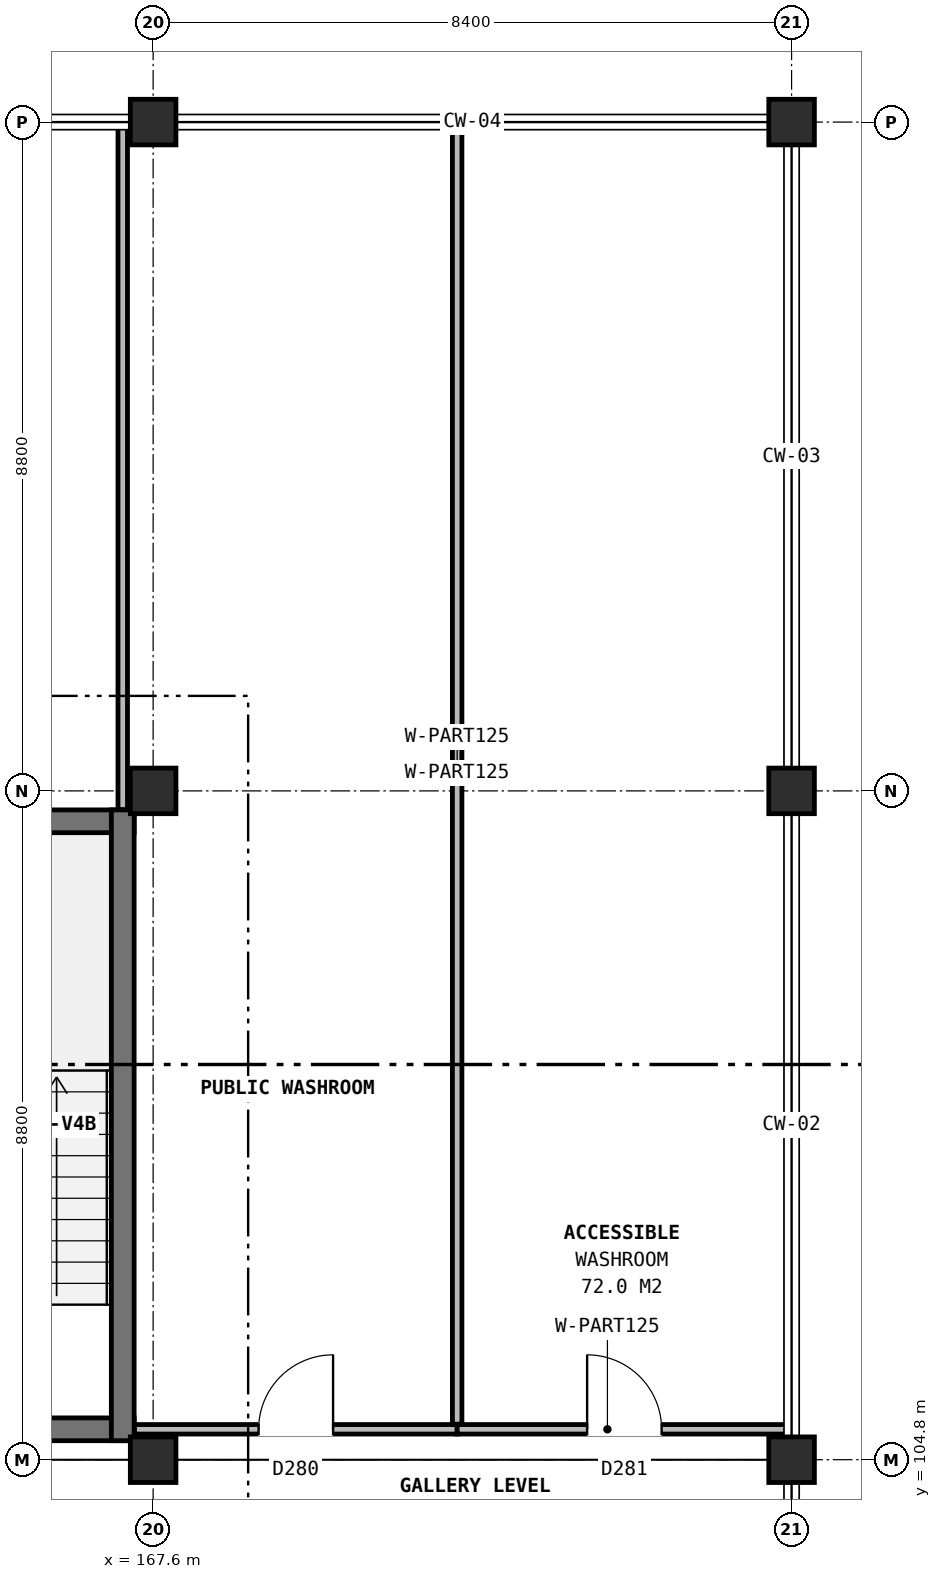
"""IFC4 building model, lengths in metres.
Left out: names, types, materials, properties, quantities, classifications, styles, units other than length and angle.
Written with IfcOpenShell. Run it as: python <this file> out.ifc"""

import sys

from ifc_helpers import new_model, si_unit, direction, frame, frame_2d, origin, origin_2d, place, context, subcontext, project, spatial, rectangle, extrude, element, fill, save


model = new_model("IFC4")
c1 = context("Model", 3, precision=1e-05, world=origin(), true_north=direction((0.0, 1.0)))
c2 = subcontext(c1, "Body", "Model", "MODEL_VIEW")
j1 = project(units=[si_unit("LENGTHUNIT", "METRE"), si_unit("PLANEANGLEUNIT", "RADIAN")], contexts=[c1])
p1 = place(None, origin())
s1 = spatial("IfcSite", under=j1, at=p1, CompositionType="ELEMENT")
p2 = place(p1, origin())
s2 = spatial("IfcBuilding", under=s1, at=p2, CompositionType="ELEMENT")
p3 = place(p2, frame((0.0, 0.0, 59.8)))
s3 = spatial("IfcBuildingStorey", under=s2, at=p3, CompositionType="ELEMENT", Elevation=59.8)
for number, where, z_axis, x_axis in (
    (1, (167.6, 104.8, 0.0), (0.0, 0.0, 1.0), (1.0, 0.0, 0.0)),
    (2, (167.6, 113.6, 0.0), (0.0, 0.0, 1.0), (1.0, 0.0, 0.0)),
    (3, (167.6, 122.4, 0.0), (0.0, 0.0, 1.0), (1.0, 0.0, 0.0)),
    (4, (176.0, 104.8, 0.0), (0.0, 0.0, 1.0), (1.0, 0.0, 0.0)),
    (5, (176.0, 113.6, 0.0), (0.0, 0.0, 1.0), (1.0, 0.0, 0.0)),
    (6, (176.0, 122.4, 0.0), (0.0, 0.0, 1.0), (1.0, 0.0, 0.0)),
):
    element("IfcColumn", number, at=place(p3, frame(where, z_axis=z_axis, x_axis=x_axis)), inside=s3, PredefinedType="COLUMN", context=c2, shape_type="SweptSolid", body=[
        extrude(rectangle(XDim=0.6, YDim=0.6, at=origin_2d()), origin(), (0.0, 0.0, 1.0), 4.0),
    ])
p4 = place(p3, frame((163.75, 105.2, 0.0), z_axis=(0.0, 0.0, 1.0), x_axis=(1.0, 0.0, 0.0)))
e7 = element("IfcWall", 7, at=p4, inside=s3, PredefinedType="SHEAR", context=c2, shape_type="SweptSolid", body=[
    extrude(rectangle(XDim=3.6, YDim=0.3, at=frame_2d((1.8, 0.0))), origin(), (0.0, 0.0, 1.0), 4.0),
])
p5 = place(p4, frame((1.05, 0.0, 0.0)))
e8 = element("IfcOpeningElement", 8, at=p5, cuts=e7, PredefinedType="OPENING", context=c2, shape_type="SweptSolid", body=[
    extrude(rectangle(XDim=1.1, YDim=2.2, at=frame_2d((0.55, 1.1))), frame((0.0, 0.16, 0.0), z_axis=(0.0, -1.0, 0.0), x_axis=(1.0, 0.0, 0.0)), (0.0, 0.0, 1.0), 0.32),
])
p6 = place(p3, frame((163.75, 113.2, 0.0), z_axis=(0.0, 0.0, 1.0), x_axis=(1.0, 0.0, 0.0)))
e9 = element("IfcWall", 9, at=p6, inside=s3, PredefinedType="SHEAR", context=c2, shape_type="SweptSolid", body=[
    extrude(rectangle(XDim=3.6, YDim=0.3, at=frame_2d((1.8, 0.0))), origin(), (0.0, 0.0, 1.0), 4.0),
])
p7 = place(p3, frame((167.2, 105.05, 0.0), z_axis=(0.0, 0.0, 1.0), x_axis=(0.0, 1.0, 0.0)))
e10 = element("IfcWall", 10, at=p7, inside=s3, PredefinedType="SHEAR", context=c2, shape_type="SweptSolid", body=[
    extrude(rectangle(XDim=8.3, YDim=0.3, at=frame_2d((4.15, 0.0))), origin(), (0.0, 0.0, 1.0), 4.0),
])
p8 = place(p3, frame((167.355, 105.2, 0.0), z_axis=(0.0, 0.0, 1.0), x_axis=(1.0, 0.0, 0.0)))
e11 = element("IfcWall", 11, at=p8, inside=s3, PredefinedType="PARTITIONING", context=c2, shape_type="SweptSolid", body=[
    extrude(rectangle(XDim=4.245, YDim=0.125, at=frame_2d((2.123, 0.0))), origin(), (0.0, 0.0, 1.0), 3.245),
])
p9 = place(p8, frame((1.633, 0.0, 0.0)))
e12 = element("IfcOpeningElement", 12, at=p9, cuts=e11, PredefinedType="OPENING", context=c2, shape_type="SweptSolid", body=[
    extrude(rectangle(XDim=0.98, YDim=2.1, at=frame_2d((0.49, 1.05))), frame((0.0, 0.073, 0.0), z_axis=(0.0, -1.0, 0.0), x_axis=(1.0, 0.0, 0.0)), (0.0, 0.0, 1.0), 0.145),
])
p10 = place(p3, frame((171.6, 105.2, 0.0), z_axis=(0.0, 0.0, 1.0), x_axis=(1.0, 0.0, 0.0)))
e13 = element("IfcWall", 13, at=p10, inside=s3, PredefinedType="PARTITIONING", context=c2, shape_type="SweptSolid", body=[
    extrude(rectangle(XDim=4.4, YDim=0.125, at=frame_2d((2.2, 0.0))), origin(), (0.0, 0.0, 1.0), 3.245),
])
p11 = place(p10, frame((1.71, 0.0, 0.0)))
e14 = element("IfcOpeningElement", 14, at=p11, cuts=e13, PredefinedType="OPENING", context=c2, shape_type="SweptSolid", body=[
    extrude(rectangle(XDim=0.98, YDim=2.1, at=frame_2d((0.49, 1.05))), frame((0.0, 0.073, 0.0), z_axis=(0.0, -1.0, 0.0), x_axis=(1.0, 0.0, 0.0)), (0.0, 0.0, 1.0), 0.145),
])
p12 = place(p3, frame((167.2, 113.355, 0.0), z_axis=(0.0, 0.0, 1.0), x_axis=(0.0, 1.0, 0.0)))
e15 = element("IfcWall", 15, at=p12, inside=s3, PredefinedType="PARTITIONING", context=c2, shape_type="SweptSolid", body=[
    extrude(rectangle(XDim=9.045, YDim=0.125, at=frame_2d((4.522, 0.0))), origin(), (0.0, 0.0, 1.0), 3.245),
])
p13 = place(p3, frame((171.6, 105.268, 0.0), z_axis=(0.0, 0.0, 1.0), x_axis=(0.0, 1.0, 0.0)))
e16 = element("IfcWall", 16, at=p13, inside=s3, PredefinedType="PARTITIONING", context=c2, shape_type="SweptSolid", body=[
    extrude(rectangle(XDim=17.132, YDim=0.125, at=frame_2d((8.566, 0.0))), origin(), (0.0, 0.0, 1.0), 3.665),
])
p14 = place(p9, origin())
e17 = element("IfcDoor", 17, at=p14, inside=s3, OperationType="SINGLE_SWING_RIGHT", PredefinedType="DOOR", context=c2, shape_type="SweptSolid", body=[
    extrude(rectangle(XDim=0.98, YDim=2.1, at=frame_2d((0.49, 1.05))), frame((0.0, 0.025, 0.0), z_axis=(0.0, -1.0, 0.0), x_axis=(1.0, 0.0, 0.0)), (0.0, 0.0, 1.0), 0.05),
])
fill(e12, e17)
p15 = place(p11, origin())
e18 = element("IfcDoor", 18, at=p15, inside=s3, OperationType="SINGLE_SWING_LEFT", PredefinedType="DOOR", context=c2, shape_type="SweptSolid", body=[
    extrude(rectangle(XDim=0.98, YDim=2.1, at=frame_2d((0.49, 1.05))), frame((0.0, 0.025, 0.0), z_axis=(0.0, -1.0, 0.0), x_axis=(1.0, 0.0, 0.0)), (0.0, 0.0, 1.0), 0.05),
])
fill(e14, e18)
save(model, sys.argv[1])
